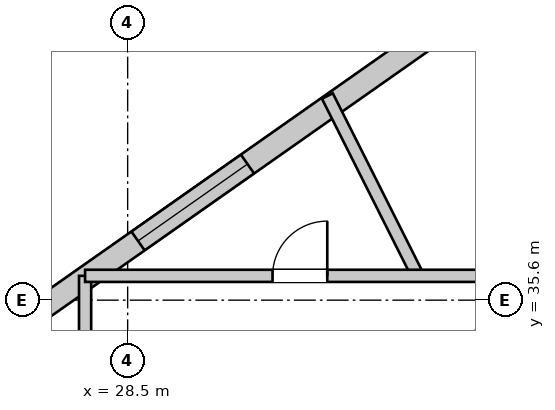
"""IFC4 building model, lengths in metres.
Left out: names, types, materials, properties, quantities, classifications, styles, units other than length and angle.
Written with IfcOpenShell. Run it as: python <this file> out.ifc"""

import sys

from ifc_helpers import new_model, si_unit, direction, frame, frame_2d, origin, place, context, subcontext, project, spatial, rectangle, extrude, source, transform, mapped, element, fill, save


model = new_model("IFC4")
c1 = context("Model", 3, precision=1e-05, world=origin(), true_north=direction((0.0, 1.0)))
c2 = subcontext(c1, "Body", "Model", "MODEL_VIEW")
j1 = project(units=[si_unit("LENGTHUNIT", "METRE"), si_unit("PLANEANGLEUNIT", "RADIAN")], contexts=[c1])
p1 = place(None, origin())
s1 = spatial("IfcSite", under=j1, at=p1, CompositionType="ELEMENT")
p2 = place(p1, origin())
s2 = spatial("IfcBuilding", under=s1, at=p2, CompositionType="ELEMENT")
p3 = place(p2, frame((0.0, 0.0, 256.1)))
s3 = spatial("IfcBuildingStorey", under=s2, at=p3, CompositionType="ELEMENT", Elevation=256.1)
p4 = place(p3, frame((15.751, 27.495, 0.0), z_axis=(0.0, 0.0, 1.0), x_axis=(0.818194527571, 0.574941488373, 0.0)))
e1 = element("IfcWall", 1, at=p4, inside=s3, PredefinedType="SOLIDWALL", context=c2, shape_type="SweptSolid", body=[
    extrude(rectangle(XDim=21.931, YDim=0.38, at=frame_2d((10.965, 0.0))), origin(), (0.0, 0.0, 1.0), 2.872),
])
p5 = place(p4, frame((5.041, 0.0, 0.502)))
e2 = element("IfcOpeningElement", 2, at=p5, cuts=e1, PredefinedType="OPENING", context=c2, shape_type="SweptSolid", body=[
    extrude(rectangle(XDim=2.2, YDim=2.25, at=frame_2d((1.1, 1.125))), frame((0.0, 0.2, 0.0), z_axis=(0.0, -1.0, 0.0), x_axis=(1.0, 0.0, 0.0)), (0.0, 0.0, 1.0), 0.4),
])
p6 = place(p4, frame((15.79, 0.0, 0.502)))
e3 = element("IfcOpeningElement", 3, at=p6, cuts=e1, PredefinedType="OPENING", context=c2, shape_type="SweptSolid", body=[
    extrude(rectangle(XDim=2.2, YDim=2.25, at=frame_2d((1.1, 1.125))), frame((0.0, 0.2, 0.0), z_axis=(0.0, -1.0, 0.0), x_axis=(1.0, 0.0, 0.0)), (0.0, 0.0, 1.0), 0.4),
])
p7 = place(p3, frame((33.272, 36.0, 0.0), z_axis=(0.0, 0.0, 1.0), x_axis=(-0.449277368576, 0.893392324841, 0.0)))
e4 = element("IfcWall", 4, at=p7, inside=s3, PredefinedType="PARTITIONING", context=c2, shape_type="SweptSolid", body=[
    extrude(rectangle(XDim=3.311, YDim=0.2, at=frame_2d((1.655, 0.0))), origin(), (0.0, 0.0, 1.0), 3.38),
])
p8 = place(p3, frame((27.8, 17.2, 0.0), z_axis=(0.0, 0.0, 1.0), x_axis=(0.0, 1.0, 0.0)))
e5 = element("IfcWall", 5, at=p8, inside=s3, PredefinedType="PARTITIONING", context=c2, shape_type="SweptSolid", body=[
    extrude(rectangle(XDim=18.8, YDim=0.2, at=frame_2d((9.4, 0.0))), origin(), (0.0, 0.0, 1.0), 3.38),
])
p9 = place(p3, frame((27.8, 36.0, 0.0), z_axis=(0.0, 0.0, 1.0), x_axis=(1.0, 0.0, 0.0)))
e6 = element("IfcWall", 6, at=p9, inside=s3, PredefinedType="PARTITIONING", context=c2, shape_type="SweptSolid", body=[
    extrude(rectangle(XDim=13.2, YDim=0.2, at=frame_2d((6.6, 0.0))), origin(), (0.0, 0.0, 1.0), 3.38),
])
p10 = place(p9, frame((11.85, 0.0, 0.0)))
e7 = element("IfcOpeningElement", 7, at=p10, cuts=e6, PredefinedType="OPENING", context=c2, shape_type="SweptSolid", body=[
    extrude(rectangle(XDim=1.05, YDim=2.2, at=frame_2d((0.525, 1.1))), frame((0.0, 0.11, 0.0), z_axis=(0.0, -1.0, 0.0), x_axis=(1.0, 0.0, 0.0)), (0.0, 0.0, 1.0), 0.22),
])
p11 = place(p9, frame((3.083, 0.0, 0.0)))
e8 = element("IfcOpeningElement", 8, at=p11, cuts=e6, PredefinedType="OPENING", context=c2, shape_type="SweptSolid", body=[
    extrude(rectangle(XDim=0.9, YDim=2.1, at=frame_2d((0.45, 1.05))), frame((0.0, 0.11, 0.0), z_axis=(0.0, -1.0, 0.0), x_axis=(1.0, 0.0, 0.0)), (0.0, 0.0, 1.0), 0.22),
])
m1 = source(origin(), c2, "Body", "SweptSolid", [
    extrude(rectangle(XDim=2.2, YDim=2.25, at=frame_2d((1.1, 1.125))), frame((0.0, 0.03, 0.0), z_axis=(0.0, -1.0, 0.0), x_axis=(1.0, 0.0, 0.0)), (0.0, 0.0, 1.0), 0.06),
])
p12 = place(p6, origin())
e9 = element("IfcWindow", 9, at=p12, inside=s3, PartitioningType="SINGLE_PANEL", PredefinedType="WINDOW", context=c2, shape_type="MappedRepresentation", body=[
    mapped(m1, transform((0.0, 0.0, 0.0), x_axis=(1.0, 0.0, 0.0), y_axis=(0.0, 1.0, 0.0), z_axis=(0.0, 0.0, 1.0), scale=1.0)),
])
fill(e3, e9)
m2 = source(origin(), c2, "Body", "SweptSolid", [
    extrude(rectangle(XDim=0.9, YDim=2.1, at=frame_2d((0.45, 1.05))), frame((0.0, 0.025, 0.0), z_axis=(0.0, -1.0, 0.0), x_axis=(1.0, 0.0, 0.0)), (0.0, 0.0, 1.0), 0.05),
])
p13 = place(p11, origin())
e10 = element("IfcDoor", 10, at=p13, inside=s3, OperationType="SINGLE_SWING_RIGHT", PredefinedType="DOOR", context=c2, shape_type="MappedRepresentation", body=[
    mapped(m2, transform((0.0, 0.0, 0.0), x_axis=(1.0, 0.0, 0.0), y_axis=(0.0, 1.0, 0.0), z_axis=(0.0, 0.0, 1.0), scale=1.0)),
])
fill(e8, e10)
save(model, sys.argv[1])
